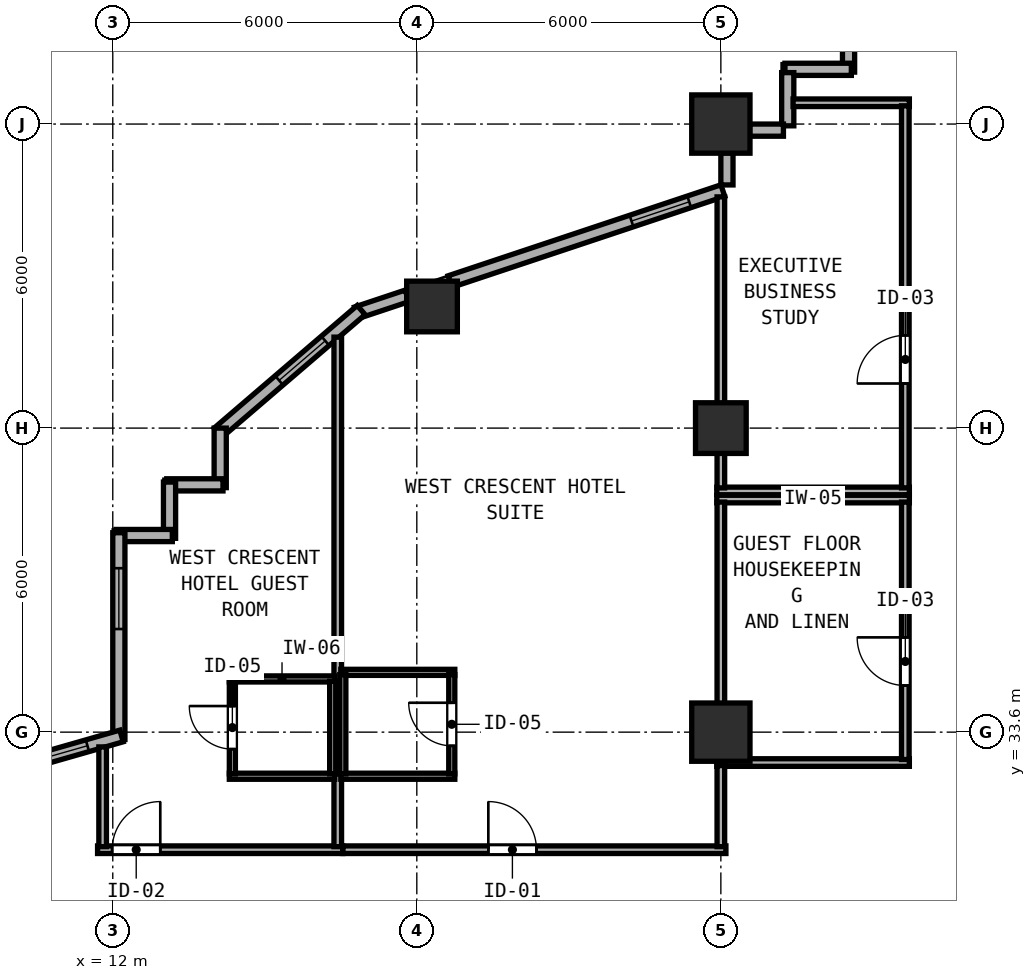
"""IFC4 building model, lengths in metres.
Left out: names, types, materials, properties, quantities, classifications, styles, units other than length and angle.
Written with IfcOpenShell. Run it as: python <this file> out.ifc"""

import sys

from ifc_helpers import new_model, si_unit, direction, frame, frame_2d, origin, origin_2d, place, context, subcontext, project, spatial, rectangle, hollow_rectangle, extrude, element, fill, save


model = new_model("IFC4")
c1 = context("Model", 3, precision=1e-05, world=origin(), true_north=direction((0.0, 1.0)))
c2 = subcontext(c1, "Body", "Model", "MODEL_VIEW")
j1 = project(units=[si_unit("LENGTHUNIT", "METRE"), si_unit("PLANEANGLEUNIT", "RADIAN")], contexts=[c1])
p1 = place(None, origin())
s1 = spatial("IfcSite", under=j1, at=p1, CompositionType="ELEMENT")
p2 = place(p1, origin())
s2 = spatial("IfcBuilding", under=s1, at=p2, CompositionType="ELEMENT")
p3 = place(p2, frame((0.0, 0.0, 59.0)))
s3 = spatial("IfcBuildingStorey", under=s2, at=p3, CompositionType="ELEMENT", Elevation=59.0)
for number, where, z_axis, x_axis in (
    (1, (24.0, 33.6, 0.0), (0.0, 0.0, 1.0), (1.0, 0.0, 0.0)),
    (2, (24.0, 45.6, 0.0), (0.0, 0.0, 1.0), (1.0, 0.0, 0.0)),
):
    element("IfcColumn", number, at=place(p3, frame(where, z_axis=z_axis, x_axis=x_axis)), inside=s3, PredefinedType="COLUMN", context=c2, shape_type="SweptSolid", body=[
        extrude(hollow_rectangle(XDim=1.15, YDim=1.15, WallThickness=0.042, at=origin_2d()), origin(), (0.0, 0.0, 1.0), 3.8),
    ])
for number, where, z_axis, x_axis in (
    (3, (24.0, 39.6, 0.0), (0.0, 0.0, 1.0), (1.0, 0.0, 0.0)),
    (4, (18.3, 42.0, 0.0), (0.0, 0.0, 1.0), (1.0, 0.0, 0.0)),
):
    element("IfcColumn", number, at=place(p3, frame(where, z_axis=z_axis, x_axis=x_axis)), inside=s3, PredefinedType="COLUMN", context=c2, shape_type="SweptSolid", body=[
        extrude(hollow_rectangle(XDim=1.0, YDim=1.0, WallThickness=0.038, at=origin_2d()), origin(), (0.0, 0.0, 1.0), 3.8),
    ])
p4 = place(p3, frame((26.52, 47.995, 0.0), z_axis=(0.0, 0.0, 1.0), x_axis=(0.0, -1.0, 0.0)))
e5 = element("IfcWall", 5, at=p4, inside=s3, PredefinedType="SOLIDWALL", context=c2, shape_type="SweptSolid", body=[
    extrude(rectangle(XDim=1.37, YDim=0.24, at=frame_2d((0.685, 0.0))), origin(), (0.0, 0.0, 1.0), 3.6),
])
p5 = place(p3, frame((26.575, 46.68, 0.0), z_axis=(0.0, 0.0, 1.0), x_axis=(-1.0, 0.0, 0.0)))
e6 = element("IfcWall", 6, at=p5, inside=s3, PredefinedType="SOLIDWALL", context=c2, shape_type="SweptSolid", body=[
    extrude(rectangle(XDim=1.31, YDim=0.24, at=frame_2d((0.655, 0.0))), origin(), (0.0, 0.0, 1.0), 3.6),
])
p6 = place(p3, frame((25.32, 46.615, 0.0), z_axis=(0.0, 0.0, 1.0), x_axis=(0.0, -1.0, 0.0)))
e7 = element("IfcWall", 7, at=p6, inside=s3, PredefinedType="SOLIDWALL", context=c2, shape_type="SweptSolid", body=[
    extrude(rectangle(XDim=1.05, YDim=0.24, at=frame_2d((0.525, 0.0))), origin(), (0.0, 0.0, 1.0), 3.6),
])
p7 = place(p3, frame((25.235, 45.48, 0.0), z_axis=(0.0, 0.0, 1.0), x_axis=(-1.0, 0.0, 0.0)))
e8 = element("IfcWall", 8, at=p7, inside=s3, PredefinedType="SOLIDWALL", context=c2, shape_type="SweptSolid", body=[
    extrude(rectangle(XDim=0.668, YDim=0.24, at=frame_2d((0.334, 0.0))), origin(), (0.0, 0.0, 1.0), 3.6),
])
p8 = place(p3, frame((24.12, 45.033, 0.0), z_axis=(0.0, 0.0, 1.0), x_axis=(0.0, -1.0, 0.0)))
e9 = element("IfcWall", 9, at=p8, inside=s3, PredefinedType="SOLIDWALL", context=c2, shape_type="SweptSolid", body=[
    extrude(rectangle(XDim=0.635, YDim=0.24, at=frame_2d((0.317, 0.0))), origin(), (0.0, 0.0, 1.0), 3.097),
])
p9 = place(p3, frame((24.039, 44.287, 0.0), z_axis=(0.0, 0.0, 1.0), x_axis=(-0.948678995954, -0.316240672014, 0.0)))
e10 = element("IfcWall", 10, at=p9, inside=s3, PredefinedType="SOLIDWALL", context=c2, shape_type="SweptSolid", body=[
    extrude(rectangle(XDim=5.675, YDim=0.24, at=frame_2d((2.837, 0.0))), origin(), (0.0, 0.0, 1.0), 3.097),
])
p10 = place(p9, frame((0.7, 0.0, 0.85)))
e11 = element("IfcOpeningElement", 11, at=p10, cuts=e10, PredefinedType="OPENING", context=c2, shape_type="SweptSolid", body=[
    extrude(rectangle(XDim=1.2, YDim=1.85, at=frame_2d((0.6, 0.925))), frame((0.0, 0.13, 0.0), z_axis=(0.0, -1.0, 0.0), x_axis=(1.0, 0.0, 0.0)), (0.0, 0.0, 1.0), 0.26),
])
p11 = place(p3, frame((17.808, 42.209, 0.0), z_axis=(0.0, 0.0, 1.0), x_axis=(-0.948706457285, -0.316158279832, 0.0)))
e12 = element("IfcWall", 12, at=p11, inside=s3, PredefinedType="SOLIDWALL", context=c2, shape_type="SweptSolid", body=[
    extrude(rectangle(XDim=1.054, YDim=0.24, at=frame_2d((0.527, 0.0))), origin(), (0.0, 0.0, 1.0), 3.6),
])
p12 = place(p3, frame((16.902, 41.929, 0.0), z_axis=(0.0, 0.0, 1.0), x_axis=(-0.759275136126, -0.650769750112, 0.0)))
e13 = element("IfcWall", 13, at=p12, inside=s3, PredefinedType="SOLIDWALL", context=c2, shape_type="SweptSolid", body=[
    extrude(rectangle(XDim=3.719, YDim=0.24, at=frame_2d((1.86, 0.0))), origin(), (0.0, 0.0, 1.0), 3.6),
])
p13 = place(p12, frame((0.934, 0.0, 0.85)))
e14 = element("IfcOpeningElement", 14, at=p13, cuts=e13, PredefinedType="OPENING", context=c2, shape_type="SweptSolid", body=[
    extrude(rectangle(XDim=1.2, YDim=1.85, at=frame_2d((0.6, 0.925))), frame((0.0, 0.13, 0.0), z_axis=(0.0, -1.0, 0.0), x_axis=(1.0, 0.0, 0.0)), (0.0, 0.0, 1.0), 0.26),
])
p14 = place(p3, frame((14.12, 39.6, 0.0), z_axis=(0.0, 0.0, 1.0), x_axis=(0.0, -1.0, 0.0)))
e15 = element("IfcWall", 15, at=p14, inside=s3, PredefinedType="SOLIDWALL", context=c2, shape_type="SweptSolid", body=[
    extrude(rectangle(XDim=1.175, YDim=0.24, at=frame_2d((0.587, 0.0))), origin(), (0.0, 0.0, 1.0), 3.6),
])
p15 = place(p3, frame((14.175, 38.48, 0.0), z_axis=(0.0, 0.0, 1.0), x_axis=(-1.0, 0.0, 0.0)))
e16 = element("IfcWall", 16, at=p15, inside=s3, PredefinedType="SOLIDWALL", context=c2, shape_type="SweptSolid", body=[
    extrude(rectangle(XDim=1.11, YDim=0.24, at=frame_2d((0.555, 0.0))), origin(), (0.0, 0.0, 1.0), 3.6),
])
p16 = place(p3, frame((13.12, 38.535, 0.0), z_axis=(0.0, 0.0, 1.0), x_axis=(0.0, -1.0, 0.0)))
e17 = element("IfcWall", 17, at=p16, inside=s3, PredefinedType="SOLIDWALL", context=c2, shape_type="SweptSolid", body=[
    extrude(rectangle(XDim=1.11, YDim=0.24, at=frame_2d((0.555, 0.0))), origin(), (0.0, 0.0, 1.0), 3.6),
])
p17 = place(p3, frame((13.175, 37.48, 0.0), z_axis=(0.0, 0.0, 1.0), x_axis=(-1.0, 0.0, 0.0)))
e18 = element("IfcWall", 18, at=p17, inside=s3, PredefinedType="SOLIDWALL", context=c2, shape_type="SweptSolid", body=[
    extrude(rectangle(XDim=1.11, YDim=0.24, at=frame_2d((0.555, 0.0))), origin(), (0.0, 0.0, 1.0), 3.6),
])
p18 = place(p3, frame((12.12, 37.535, 0.0), z_axis=(0.0, 0.0, 1.0), x_axis=(0.0, -1.0, 0.0)))
e19 = element("IfcWall", 19, at=p18, inside=s3, PredefinedType="SOLIDWALL", context=c2, shape_type="SweptSolid", body=[
    extrude(rectangle(XDim=4.08, YDim=0.24, at=frame_2d((2.04, 0.0))), origin(), (0.0, 0.0, 1.0), 3.6),
])
p19 = place(p18, frame((0.7, 0.0, 0.85)))
e20 = element("IfcOpeningElement", 20, at=p19, cuts=e19, PredefinedType="OPENING", context=c2, shape_type="SweptSolid", body=[
    extrude(rectangle(XDim=1.2, YDim=1.85, at=frame_2d((0.6, 0.925))), frame((0.0, 0.13, 0.0), z_axis=(0.0, -1.0, 0.0), x_axis=(1.0, 0.0, 0.0)), (0.0, 0.0, 1.0), 0.26),
])
p20 = place(p3, frame((12.173, 33.525, 0.0), z_axis=(0.0, 0.0, 1.0), x_axis=(-0.961351601853, -0.275323623424, 0.0)))
e21 = element("IfcWall", 21, at=p20, inside=s3, PredefinedType="SOLIDWALL", context=c2, shape_type="SweptSolid", body=[
    extrude(rectangle(XDim=8.883, YDim=0.24, at=frame_2d((4.442, 0.0))), origin(), (0.0, 0.0, 1.0), 3.6),
])
p21 = place(p20, frame((0.7, 0.0, 0.85)))
e22 = element("IfcOpeningElement", 22, at=p21, cuts=e21, PredefinedType="OPENING", context=c2, shape_type="SweptSolid", body=[
    extrude(rectangle(XDim=1.2, YDim=1.85, at=frame_2d((0.6, 0.925))), frame((0.0, 0.13, 0.0), z_axis=(0.0, -1.0, 0.0), x_axis=(1.0, 0.0, 0.0)), (0.0, 0.0, 1.0), 0.26),
])
p22 = place(p20, frame((6.1, 0.0, 0.85)))
e23 = element("IfcOpeningElement", 23, at=p22, cuts=e21, PredefinedType="OPENING", context=c2, shape_type="SweptSolid", body=[
    extrude(rectangle(XDim=1.2, YDim=1.85, at=frame_2d((0.6, 0.925))), frame((0.0, 0.13, 0.0), z_axis=(0.0, -1.0, 0.0), x_axis=(1.0, 0.0, 0.0)), (0.0, 0.0, 1.0), 0.26),
])
for number, where, z_axis, x_axis in (
    (24, (23.92, 38.2, 0.0), (0.0, 0.0, 1.0), (1.0, 0.0, 0.0)),
    (25, (23.92, 33.0, 0.0), (0.0, 0.0, 1.0), (1.0, 0.0, 0.0)),
):
    element("IfcWall", number, at=place(p3, frame(where, z_axis=z_axis, x_axis=x_axis)), inside=s3, PredefinedType="PARTITIONING", context=c2, shape_type="SweptSolid", body=[
        extrude(rectangle(XDim=3.8, YDim=0.15, at=frame_2d((1.9, 0.0))), origin(), (0.0, 0.0, 1.0), 3.6),
    ])
p23 = place(p3, frame((24.0, 33.06, 0.0), z_axis=(0.0, 0.0, 1.0), x_axis=(0.0, 1.0, 0.0)))
e26 = element("IfcWall", 26, at=p23, inside=s3, PredefinedType="PARTITIONING", context=c2, shape_type="SweptSolid", body=[
    extrude(rectangle(XDim=5.08, YDim=0.15, at=frame_2d((2.54, 0.0))), origin(), (0.0, 0.0, 1.0), 3.097),
])
p24 = place(p3, frame((27.64, 33.06, 0.0), z_axis=(0.0, 0.0, 1.0), x_axis=(0.0, 1.0, 0.0)))
e27 = element("IfcWall", 27, at=p24, inside=s3, PredefinedType="PARTITIONING", context=c2, shape_type="SweptSolid", body=[
    extrude(rectangle(XDim=5.08, YDim=0.15, at=frame_2d((2.54, 0.0))), origin(), (0.0, 0.0, 1.0), 3.6),
])
p25 = place(p24, frame((2.41, 0.0, 0.0), z_axis=(0.0, 0.0, 1.0), x_axis=(-1.0, 0.0, 0.0)))
e28 = element("IfcOpeningElement", 28, at=p25, cuts=e27, PredefinedType="OPENING", context=c2, shape_type="SweptSolid", body=[
    extrude(rectangle(XDim=0.95, YDim=2.12, at=frame_2d((0.475, 1.06))), frame((0.0, 0.085, 0.0), z_axis=(0.0, -1.0, 0.0), x_axis=(1.0, 0.0, 0.0)), (0.0, 0.0, 1.0), 0.17),
])
p26 = place(p3, frame((25.425, 46.02, 0.0), z_axis=(0.0, 0.0, 1.0), x_axis=(1.0, 0.0, 0.0)))
e29 = element("IfcWall", 29, at=p26, inside=s3, PredefinedType="PARTITIONING", context=c2, shape_type="SweptSolid", body=[
    extrude(rectangle(XDim=2.295, YDim=0.15, at=frame_2d((1.147, 0.0))), origin(), (0.0, 0.0, 1.0), 3.6),
])
p27 = place(p3, frame((23.92, 38.36, 0.0), z_axis=(0.0, 0.0, 1.0), x_axis=(1.0, 0.0, 0.0)))
e30 = element("IfcWall", 30, at=p27, inside=s3, PredefinedType="PARTITIONING", context=c2, shape_type="SweptSolid", body=[
    extrude(rectangle(XDim=3.8, YDim=0.15, at=frame_2d((1.9, 0.0))), origin(), (0.0, 0.0, 1.0), 3.6),
])
p28 = place(p3, frame((24.0, 38.42, 0.0), z_axis=(0.0, 0.0, 1.0), x_axis=(0.0, 1.0, 0.0)))
e31 = element("IfcWall", 31, at=p28, inside=s3, PredefinedType="PARTITIONING", context=c2, shape_type="SweptSolid", body=[
    extrude(rectangle(XDim=5.743, YDim=0.15, at=frame_2d((2.872, 0.0))), origin(), (0.0, 0.0, 1.0), 3.097),
])
p29 = place(p3, frame((27.64, 38.42, 0.0), z_axis=(0.0, 0.0, 1.0), x_axis=(0.0, 1.0, 0.0)))
e32 = element("IfcWall", 32, at=p29, inside=s3, PredefinedType="PARTITIONING", context=c2, shape_type="SweptSolid", body=[
    extrude(rectangle(XDim=7.54, YDim=0.15, at=frame_2d((3.77, 0.0))), origin(), (0.0, 0.0, 1.0), 3.6),
])
p30 = place(p29, frame((3.01, 0.0, 0.0), z_axis=(0.0, 0.0, 1.0), x_axis=(-1.0, 0.0, 0.0)))
e33 = element("IfcOpeningElement", 33, at=p30, cuts=e32, PredefinedType="OPENING", context=c2, shape_type="SweptSolid", body=[
    extrude(rectangle(XDim=0.95, YDim=2.12, at=frame_2d((0.475, 1.06))), frame((0.0, 0.085, 0.0), z_axis=(0.0, -1.0, 0.0), x_axis=(1.0, 0.0, 0.0)), (0.0, 0.0, 1.0), 0.17),
])
p31 = place(p3, frame((11.7, 31.28, 0.0), z_axis=(0.0, 0.0, 1.0), x_axis=(1.0, 0.0, 0.0)))
e34 = element("IfcWall", 34, at=p31, inside=s3, PredefinedType="PARTITIONING", context=c2, shape_type="SweptSolid", body=[
    extrude(rectangle(XDim=4.84, YDim=0.15, at=frame_2d((2.42, 0.0))), origin(), (0.0, 0.0, 1.0), 3.6),
])
p32 = place(p31, frame((0.288, 0.0, 0.0)))
e35 = element("IfcOpeningElement", 35, at=p32, cuts=e34, PredefinedType="OPENING", context=c2, shape_type="SweptSolid", body=[
    extrude(rectangle(XDim=0.95, YDim=2.15, at=frame_2d((0.475, 1.075))), frame((0.0, 0.085, 0.0), z_axis=(0.0, -1.0, 0.0), x_axis=(1.0, 0.0, 0.0)), (0.0, 0.0, 1.0), 0.17),
])
p33 = place(p3, frame((11.8, 31.34, 0.0), z_axis=(0.0, 0.0, 1.0), x_axis=(0.0, 1.0, 0.0)))
e36 = element("IfcWall", 36, at=p33, inside=s3, PredefinedType="PARTITIONING", context=c2, shape_type="SweptSolid", body=[
    extrude(rectangle(XDim=1.969, YDim=0.15, at=frame_2d((0.984, 0.0))), origin(), (0.0, 0.0, 1.0), 3.6),
])
p34 = place(p3, frame((16.44, 31.34, 0.0), z_axis=(0.0, 0.0, 1.0), x_axis=(0.0, 1.0, 0.0)))
e37 = element("IfcWall", 37, at=p34, inside=s3, PredefinedType="PARTITIONING", context=c2, shape_type="SweptSolid", body=[
    extrude(rectangle(XDim=10.055, YDim=0.15, at=frame_2d((5.027, 0.0))), origin(), (0.0, 0.0, 1.0), 3.6),
])
for number, where, z_axis, x_axis in (
    (38, (14.3, 34.65, 0.0), (0.0, 0.0, 1.0), (1.0, 0.0, 0.0)),
    (39, (14.3, 32.73, 0.0), (0.0, 0.0, 1.0), (1.0, 0.0, 0.0)),
):
    element("IfcWall", number, at=place(p3, frame(where, z_axis=z_axis, x_axis=x_axis)), inside=s3, PredefinedType="PARTITIONING", context=c2, shape_type="SweptSolid", body=[
        extrude(rectangle(XDim=2.08, YDim=0.12, at=frame_2d((1.04, 0.0))), origin(), (0.0, 0.0, 1.0), 3.6),
    ])
p35 = place(p3, frame((14.36, 32.775, 0.0), z_axis=(0.0, 0.0, 1.0), x_axis=(0.0, 1.0, 0.0)))
e40 = element("IfcWall", 40, at=p35, inside=s3, PredefinedType="PARTITIONING", context=c2, shape_type="SweptSolid", body=[
    extrude(rectangle(XDim=1.83, YDim=0.12, at=frame_2d((0.915, 0.0))), origin(), (0.0, 0.0, 1.0), 3.6),
])
p36 = place(p35, frame((1.34, 0.0, 0.0), z_axis=(0.0, 0.0, 1.0), x_axis=(-1.0, 0.0, 0.0)))
e41 = element("IfcOpeningElement", 41, at=p36, cuts=e40, PredefinedType="OPENING", context=c2, shape_type="SweptSolid", body=[
    extrude(rectangle(XDim=0.85, YDim=2.1, at=frame_2d((0.425, 1.05))), frame((0.0, 0.07, 0.0), z_axis=(0.0, -1.0, 0.0), x_axis=(1.0, 0.0, 0.0)), (0.0, 0.0, 1.0), 0.14),
])
p37 = place(p3, frame((16.34, 32.775, 0.0), z_axis=(0.0, 0.0, 1.0), x_axis=(0.0, 1.0, 0.0)))
e42 = element("IfcWall", 42, at=p37, inside=s3, PredefinedType="PARTITIONING", context=c2, shape_type="SweptSolid", body=[
    extrude(rectangle(XDim=1.83, YDim=0.12, at=frame_2d((0.915, 0.0))), origin(), (0.0, 0.0, 1.0), 3.6),
])
p38 = place(p3, frame((16.542, 31.28, 0.0), z_axis=(0.0, 0.0, 1.0), x_axis=(1.0, 0.0, 0.0)))
e43 = element("IfcWall", 43, at=p38, inside=s3, PredefinedType="PARTITIONING", context=c2, shape_type="SweptSolid", body=[
    extrude(rectangle(XDim=7.558, YDim=0.15, at=frame_2d((3.779, 0.0))), origin(), (0.0, 0.0, 1.0), 3.6),
])
p39 = place(p38, frame((2.869, 0.0, 0.0)))
e44 = element("IfcOpeningElement", 44, at=p39, cuts=e43, PredefinedType="OPENING", context=c2, shape_type="SweptSolid", body=[
    extrude(rectangle(XDim=0.95, YDim=2.18, at=frame_2d((0.475, 1.09))), frame((0.0, 0.085, 0.0), z_axis=(0.0, -1.0, 0.0), x_axis=(1.0, 0.0, 0.0)), (0.0, 0.0, 1.0), 0.17),
])
p40 = place(p3, frame((24.0, 31.34, 0.0), z_axis=(0.0, 0.0, 1.0), x_axis=(0.0, 1.0, 0.0)))
e45 = element("IfcWall", 45, at=p40, inside=s3, PredefinedType="PARTITIONING", context=c2, shape_type="SweptSolid", body=[
    extrude(rectangle(XDim=1.6, YDim=0.15, at=frame_2d((0.8, 0.0))), origin(), (0.0, 0.0, 1.0), 3.097),
])
for number, where, z_axis, x_axis in (
    (46, (16.5, 34.78, 0.0), (0.0, 0.0, 1.0), (1.0, 0.0, 0.0)),
    (47, (16.5, 32.73, 0.0), (0.0, 0.0, 1.0), (1.0, 0.0, 0.0)),
):
    element("IfcWall", number, at=place(p3, frame(where, z_axis=z_axis, x_axis=x_axis)), inside=s3, PredefinedType="PARTITIONING", context=c2, shape_type="SweptSolid", body=[
        extrude(rectangle(XDim=2.25, YDim=0.12, at=frame_2d((1.125, 0.0))), origin(), (0.0, 0.0, 1.0), 3.6),
    ])
p41 = place(p3, frame((16.54, 32.775, 0.0), z_axis=(0.0, 0.0, 1.0), x_axis=(0.0, 1.0, 0.0)))
e48 = element("IfcWall", 48, at=p41, inside=s3, PredefinedType="PARTITIONING", context=c2, shape_type="SweptSolid", body=[
    extrude(rectangle(XDim=1.96, YDim=0.12, at=frame_2d((0.98, 0.0))), origin(), (0.0, 0.0, 1.0), 3.6),
])
p42 = place(p3, frame((18.69, 32.775, 0.0), z_axis=(0.0, 0.0, 1.0), x_axis=(0.0, 1.0, 0.0)))
e49 = element("IfcWall", 49, at=p42, inside=s3, PredefinedType="PARTITIONING", context=c2, shape_type="SweptSolid", body=[
    extrude(rectangle(XDim=1.96, YDim=0.12, at=frame_2d((0.98, 0.0))), origin(), (0.0, 0.0, 1.0), 3.6),
])
p43 = place(p42, frame((0.555, 0.0, 0.0)))
e50 = element("IfcOpeningElement", 50, at=p43, cuts=e49, PredefinedType="OPENING", context=c2, shape_type="SweptSolid", body=[
    extrude(rectangle(XDim=0.85, YDim=2.1, at=frame_2d((0.425, 1.05))), frame((0.0, 0.07, 0.0), z_axis=(0.0, -1.0, 0.0), x_axis=(1.0, 0.0, 0.0)), (0.0, 0.0, 1.0), 0.14),
])
p44 = place(p10, origin())
e51 = element("IfcWindow", 51, at=p44, inside=s3, PartitioningType="SINGLE_PANEL", PredefinedType="WINDOW", context=c2, shape_type="SweptSolid", body=[
    extrude(rectangle(XDim=1.2, YDim=1.85, at=frame_2d((0.6, 0.925))), frame((0.0, 0.03, 0.0), z_axis=(0.0, -1.0, 0.0), x_axis=(1.0, 0.0, 0.0)), (0.0, 0.0, 1.0), 0.06),
])
fill(e11, e51)
p45 = place(p13, origin())
e52 = element("IfcWindow", 52, at=p45, inside=s3, PartitioningType="SINGLE_PANEL", PredefinedType="WINDOW", context=c2, shape_type="SweptSolid", body=[
    extrude(rectangle(XDim=1.2, YDim=1.85, at=frame_2d((0.6, 0.925))), frame((0.0, 0.03, 0.0), z_axis=(0.0, -1.0, 0.0), x_axis=(1.0, 0.0, 0.0)), (0.0, 0.0, 1.0), 0.06),
])
fill(e14, e52)
p46 = place(p19, origin())
e53 = element("IfcWindow", 53, at=p46, inside=s3, PartitioningType="SINGLE_PANEL", PredefinedType="WINDOW", context=c2, shape_type="SweptSolid", body=[
    extrude(rectangle(XDim=1.2, YDim=1.85, at=frame_2d((0.6, 0.925))), frame((0.0, 0.03, 0.0), z_axis=(0.0, -1.0, 0.0), x_axis=(1.0, 0.0, 0.0)), (0.0, 0.0, 1.0), 0.06),
])
fill(e20, e53)
p47 = place(p21, origin())
e54 = element("IfcWindow", 54, at=p47, inside=s3, PartitioningType="SINGLE_PANEL", PredefinedType="WINDOW", context=c2, shape_type="SweptSolid", body=[
    extrude(rectangle(XDim=1.2, YDim=1.85, at=frame_2d((0.6, 0.925))), frame((0.0, 0.03, 0.0), z_axis=(0.0, -1.0, 0.0), x_axis=(1.0, 0.0, 0.0)), (0.0, 0.0, 1.0), 0.06),
])
fill(e22, e54)
p48 = place(p25, origin())
e55 = element("IfcDoor", 55, at=p48, inside=s3, OperationType="SINGLE_SWING_LEFT", PredefinedType="DOOR", context=c2, shape_type="SweptSolid", body=[
    extrude(rectangle(XDim=0.95, YDim=2.12, at=frame_2d((0.475, 1.06))), frame((0.0, 0.025, 0.0), z_axis=(0.0, -1.0, 0.0), x_axis=(1.0, 0.0, 0.0)), (0.0, 0.0, 1.0), 0.05),
])
fill(e28, e55)
p49 = place(p30, origin())
e56 = element("IfcDoor", 56, at=p49, inside=s3, OperationType="SINGLE_SWING_RIGHT", PredefinedType="DOOR", context=c2, shape_type="SweptSolid", body=[
    extrude(rectangle(XDim=0.95, YDim=2.12, at=frame_2d((0.475, 1.06))), frame((0.0, 0.025, 0.0), z_axis=(0.0, -1.0, 0.0), x_axis=(1.0, 0.0, 0.0)), (0.0, 0.0, 1.0), 0.05),
])
fill(e33, e56)
p50 = place(p32, origin())
e57 = element("IfcDoor", 57, at=p50, inside=s3, OperationType="SINGLE_SWING_RIGHT", PredefinedType="DOOR", context=c2, shape_type="SweptSolid", body=[
    extrude(rectangle(XDim=0.95, YDim=2.15, at=frame_2d((0.475, 1.075))), frame((0.0, 0.025, 0.0), z_axis=(0.0, -1.0, 0.0), x_axis=(1.0, 0.0, 0.0)), (0.0, 0.0, 1.0), 0.05),
])
fill(e35, e57)
p51 = place(p36, origin())
e58 = element("IfcDoor", 58, at=p51, inside=s3, OperationType="SINGLE_SWING_LEFT", PredefinedType="DOOR", context=c2, shape_type="SweptSolid", body=[
    extrude(rectangle(XDim=0.85, YDim=2.1, at=frame_2d((0.425, 1.05))), frame((0.0, 0.025, 0.0), z_axis=(0.0, -1.0, 0.0), x_axis=(1.0, 0.0, 0.0)), (0.0, 0.0, 1.0), 0.05),
])
fill(e41, e58)
p52 = place(p39, origin())
e59 = element("IfcDoor", 59, at=p52, inside=s3, OperationType="SINGLE_SWING_LEFT", PredefinedType="DOOR", context=c2, shape_type="SweptSolid", body=[
    extrude(rectangle(XDim=0.95, YDim=2.18, at=frame_2d((0.475, 1.09))), frame((0.0, 0.025, 0.0), z_axis=(0.0, -1.0, 0.0), x_axis=(1.0, 0.0, 0.0)), (0.0, 0.0, 1.0), 0.05),
])
fill(e44, e59)
p53 = place(p43, origin())
e60 = element("IfcDoor", 60, at=p53, inside=s3, OperationType="SINGLE_SWING_RIGHT", PredefinedType="DOOR", context=c2, shape_type="SweptSolid", body=[
    extrude(rectangle(XDim=0.85, YDim=2.1, at=frame_2d((0.425, 1.05))), frame((0.0, 0.025, 0.0), z_axis=(0.0, -1.0, 0.0), x_axis=(1.0, 0.0, 0.0)), (0.0, 0.0, 1.0), 0.05),
])
fill(e50, e60)
save(model, sys.argv[1])
